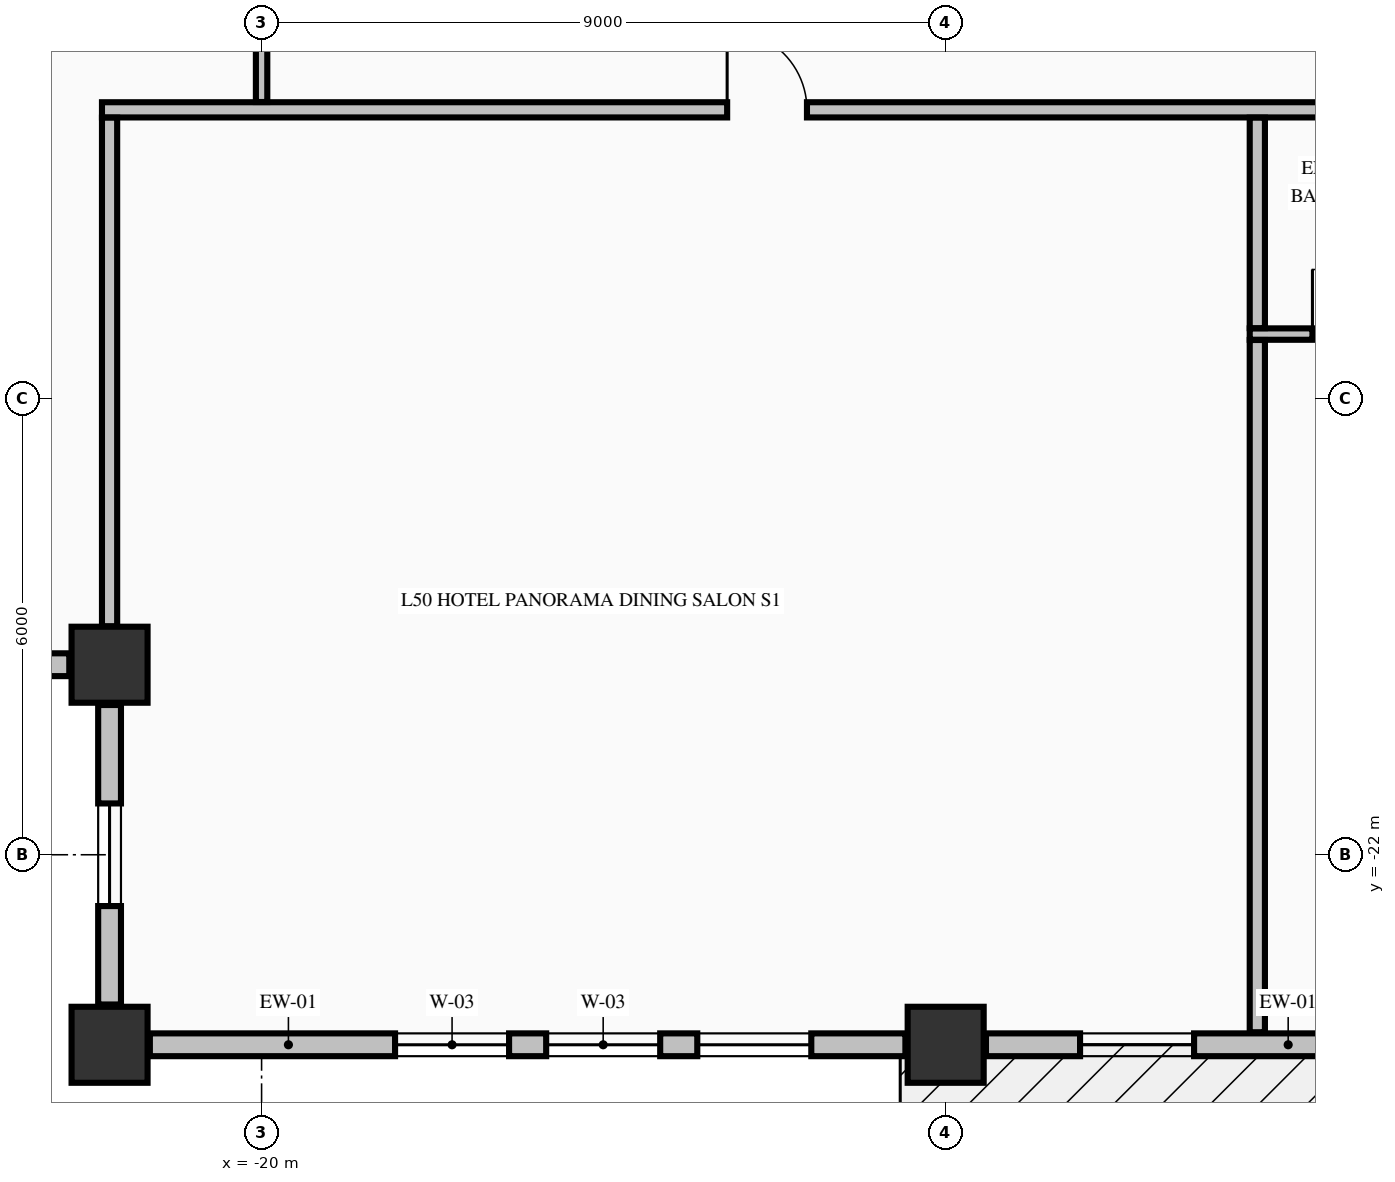
"""IFC4 building model, lengths in metres.
Left out: names, types, materials, properties, quantities, classifications, styles, units other than length and angle.
Written with IfcOpenShell. Run it as: python <this file> out.ifc"""

import sys

from ifc_helpers import new_model, si_unit, direction, frame, frame_2d, origin, origin_2d, place, context, subcontext, project, spatial, rectangle, extrude, element, fill, save


model = new_model("IFC4")
c1 = context("Model", 3, precision=1e-05, world=origin(), true_north=direction((0.0, 1.0)))
c2 = subcontext(c1, "Body", "Model", "MODEL_VIEW")
j1 = project(units=[si_unit("LENGTHUNIT", "METRE"), si_unit("PLANEANGLEUNIT", "RADIAN")], contexts=[c1])
p1 = place(None, origin())
s1 = spatial("IfcSite", under=j1, at=p1, CompositionType="ELEMENT")
p2 = place(p1, origin())
s2 = spatial("IfcBuilding", under=s1, at=p2, CompositionType="ELEMENT")
p3 = place(p2, frame((0.0, 0.0, 194.86)))
s3 = spatial("IfcBuildingStorey", under=s2, at=p3, CompositionType="ELEMENT", Elevation=194.86)
for number, where, z_axis, x_axis in (
    (1, (-22.0, -24.5, -0.275), (0.0, 0.0, 1.0), (1.0, 0.0, 0.0)),
    (2, (-11.0, -24.5, -0.275), (0.0, 0.0, 1.0), (1.0, 0.0, 0.0)),
    (3, (-22.0, -19.5, -0.275), (0.0, 0.0, 1.0), (1.0, 0.0, 0.0)),
):
    element("IfcColumn", number, at=place(p3, frame(where, z_axis=z_axis, x_axis=x_axis)), inside=s3, PredefinedType="COLUMN", context=c2, shape_type="SweptSolid", body=[
        extrude(rectangle(XDim=1.0, YDim=1.0, at=origin_2d()), origin(), (0.0, 0.0, 1.0), 3.425),
    ])
p4 = place(p3, frame((-26.47, -19.5, 0.0), z_axis=(0.0, 0.0, 1.0), x_axis=(1.0, 0.0, 0.0)))
e4 = element("IfcWall", 4, at=p4, inside=s3, PredefinedType="STANDARD", context=c2, shape_type="SweptSolid", body=[
    extrude(rectangle(XDim=3.94, YDim=0.3, at=frame_2d((1.97, 0.0))), origin(), (0.0, 0.0, 1.0), 2.542),
])
p5 = place(p4, frame((1.295, 0.0, 0.68)))
e5 = element("IfcOpeningElement", 5, at=p5, cuts=e4, PredefinedType="OPENING", context=c2, shape_type="SweptSolid", body=[
    extrude(rectangle(XDim=1.35, YDim=1.42, at=frame_2d((0.675, 0.71))), frame((0.0, 0.16, 0.0), z_axis=(0.0, -1.0, 0.0), x_axis=(1.0, 0.0, 0.0)), (0.0, 0.0, 1.0), 0.32),
])
p6 = place(p3, frame((-22.0, -20.03, 0.0), z_axis=(0.0, 0.0, 1.0), x_axis=(0.0, -1.0, 0.0)))
e6 = element("IfcWall", 6, at=p6, inside=s3, PredefinedType="STANDARD", context=c2, shape_type="SweptSolid", body=[
    extrude(rectangle(XDim=3.94, YDim=0.3, at=frame_2d((1.97, 0.0))), origin(), (0.0, 0.0, 1.0), 2.542),
])
p7 = place(p6, frame((1.295, 0.0, 0.68)))
e7 = element("IfcOpeningElement", 7, at=p7, cuts=e6, PredefinedType="OPENING", context=c2, shape_type="SweptSolid", body=[
    extrude(rectangle(XDim=1.35, YDim=1.42, at=frame_2d((0.675, 0.71))), frame((0.0, 0.16, 0.0), z_axis=(0.0, -1.0, 0.0), x_axis=(1.0, 0.0, 0.0)), (0.0, 0.0, 1.0), 0.32),
])
p8 = place(p3, frame((-21.47, -24.5, 0.0), z_axis=(0.0, 0.0, 1.0), x_axis=(1.0, 0.0, 0.0)))
e8 = element("IfcWall", 8, at=p8, inside=s3, PredefinedType="STANDARD", context=c2, shape_type="SweptSolid", body=[
    extrude(rectangle(XDim=9.94, YDim=0.3, at=frame_2d((4.97, 0.0))), origin(), (0.0, 0.0, 1.0), 2.542),
])
p9 = place(p8, frame((3.226, 0.0, 0.72)))
e9 = element("IfcOpeningElement", 9, at=p9, cuts=e8, PredefinedType="OPENING", context=c2, shape_type="SweptSolid", body=[
    extrude(rectangle(XDim=1.5, YDim=1.6, at=frame_2d((0.75, 0.8))), frame((0.0, 0.16, 0.0), z_axis=(0.0, -1.0, 0.0), x_axis=(1.0, 0.0, 0.0)), (0.0, 0.0, 1.0), 0.32),
])
p10 = place(p8, frame((5.214, 0.0, 0.72)))
e10 = element("IfcOpeningElement", 10, at=p10, cuts=e8, PredefinedType="OPENING", context=c2, shape_type="SweptSolid", body=[
    extrude(rectangle(XDim=1.5, YDim=1.6, at=frame_2d((0.75, 0.8))), frame((0.0, 0.16, 0.0), z_axis=(0.0, -1.0, 0.0), x_axis=(1.0, 0.0, 0.0)), (0.0, 0.0, 1.0), 0.32),
])
p11 = place(p8, frame((7.202, 0.0, 0.72)))
e11 = element("IfcOpeningElement", 11, at=p11, cuts=e8, PredefinedType="OPENING", context=c2, shape_type="SweptSolid", body=[
    extrude(rectangle(XDim=1.5, YDim=1.6, at=frame_2d((0.75, 0.8))), frame((0.0, 0.16, 0.0), z_axis=(0.0, -1.0, 0.0), x_axis=(1.0, 0.0, 0.0)), (0.0, 0.0, 1.0), 0.32),
])
p12 = place(p3, frame((-10.47, -24.5, 0.0), z_axis=(0.0, 0.0, 1.0), x_axis=(1.0, 0.0, 0.0)))
e12 = element("IfcWall", 12, at=p12, inside=s3, PredefinedType="STANDARD", context=c2, shape_type="SweptSolid", body=[
    extrude(rectangle(XDim=9.94, YDim=0.3, at=frame_2d((4.97, 0.0))), origin(), (0.0, 0.0, 1.0), 2.542),
])
p13 = place(p12, frame((8.64, 0.0, 0.0)))
e13 = element("IfcOpeningElement", 13, at=p13, cuts=e12, PredefinedType="OPENING", context=c2, shape_type="SweptSolid", body=[
    extrude(rectangle(XDim=1.1, YDim=2.15, at=frame_2d((0.55, 1.075))), frame((0.0, 0.16, 0.0), z_axis=(0.0, -1.0, 0.0), x_axis=(1.0, 0.0, 0.0)), (0.0, 0.0, 1.0), 0.32),
])
p14 = place(p12, frame((1.238, 0.0, 0.72)))
e14 = element("IfcOpeningElement", 14, at=p14, cuts=e12, PredefinedType="OPENING", context=c2, shape_type="SweptSolid", body=[
    extrude(rectangle(XDim=1.5, YDim=1.6, at=frame_2d((0.75, 0.8))), frame((0.0, 0.16, 0.0), z_axis=(0.0, -1.0, 0.0), x_axis=(1.0, 0.0, 0.0)), (0.0, 0.0, 1.0), 0.32),
])
p15 = place(p12, frame((5.214, 0.0, 0.72)))
e15 = element("IfcOpeningElement", 15, at=p15, cuts=e12, PredefinedType="OPENING", context=c2, shape_type="SweptSolid", body=[
    extrude(rectangle(XDim=1.5, YDim=1.6, at=frame_2d((0.75, 0.8))), frame((0.0, 0.16, 0.0), z_axis=(0.0, -1.0, 0.0), x_axis=(1.0, 0.0, 0.0)), (0.0, 0.0, 1.0), 0.32),
])
p16 = place(p3, frame((-7.0, -15.15, 0.0), z_axis=(0.0, 0.0, 1.0), x_axis=(1.0, 0.0, 0.0)))
e16 = element("IfcWall", 16, at=p16, inside=s3, PredefinedType="PARTITIONING", context=c2, shape_type="SweptSolid", body=[
    extrude(rectangle(XDim=2.475, YDim=0.15, at=frame_2d((1.238, 0.0))), origin(), (0.0, 0.0, 1.0), 3.15),
])
p17 = place(p16, frame((0.825, 0.0, 0.0)))
e17 = element("IfcOpeningElement", 17, at=p17, cuts=e16, PredefinedType="OPENING", context=c2, shape_type="SweptSolid", body=[
    extrude(rectangle(XDim=0.85, YDim=2.1, at=frame_2d((0.425, 1.05))), frame((0.0, 0.085, 0.0), z_axis=(0.0, -1.0, 0.0), x_axis=(1.0, 0.0, 0.0)), (0.0, 0.0, 1.0), 0.17),
])
p18 = place(p3, frame((-22.1, -12.2, 0.0), z_axis=(0.0, 0.0, 1.0), x_axis=(1.0, 0.0, 0.0)))
e18 = element("IfcWall", 18, at=p18, inside=s3, PredefinedType="PARTITIONING", context=c2, shape_type="SweptSolid", body=[
    extrude(rectangle(XDim=39.2, YDim=0.2, at=frame_2d((19.6, 0.0))), origin(), (0.0, 0.0, 1.0), 3.15),
])
p19 = place(p18, frame((8.225, 0.0, 0.0)))
e19 = element("IfcOpeningElement", 19, at=p19, cuts=e18, PredefinedType="OPENING", context=c2, shape_type="SweptSolid", body=[
    extrude(rectangle(XDim=1.05, YDim=2.15, at=frame_2d((0.525, 1.075))), frame((0.0, 0.11, 0.0), z_axis=(0.0, -1.0, 0.0), x_axis=(1.0, 0.0, 0.0)), (0.0, 0.0, 1.0), 0.22),
])
p20 = place(p18, frame((18.675, 0.0, 0.0)))
e20 = element("IfcOpeningElement", 20, at=p20, cuts=e18, PredefinedType="OPENING", context=c2, shape_type="SweptSolid", body=[
    extrude(rectangle(XDim=0.95, YDim=2.15, at=frame_2d((0.475, 1.075))), frame((0.0, 0.11, 0.0), z_axis=(0.0, -1.0, 0.0), x_axis=(1.0, 0.0, 0.0)), (0.0, 0.0, 1.0), 0.22),
])
p21 = place(p18, frame((34.325, 0.0, 0.0)))
e21 = element("IfcOpeningElement", 21, at=p21, cuts=e18, PredefinedType="OPENING", context=c2, shape_type="SweptSolid", body=[
    extrude(rectangle(XDim=0.95, YDim=2.15, at=frame_2d((0.475, 1.075))), frame((0.0, 0.11, 0.0), z_axis=(0.0, -1.0, 0.0), x_axis=(1.0, 0.0, 0.0)), (0.0, 0.0, 1.0), 0.22),
])
p22 = place(p3, frame((-22.0, -18.994, 0.0), z_axis=(0.0, 0.0, 1.0), x_axis=(0.0, 1.0, 0.0)))
e22 = element("IfcWall", 22, at=p22, inside=s3, PredefinedType="PARTITIONING", context=c2, shape_type="SweptSolid", body=[
    extrude(rectangle(XDim=6.691, YDim=0.2, at=frame_2d((3.345, 0.0))), origin(), (0.0, 0.0, 1.0), 3.15),
])
p23 = place(p3, frame((-20.0, -12.097, 0.0), z_axis=(0.0, 0.0, 1.0), x_axis=(0.0, 1.0, 0.0)))
e23 = element("IfcWall", 23, at=p23, inside=s3, PredefinedType="PARTITIONING", context=c2, shape_type="SweptSolid", body=[
    extrude(rectangle(XDim=1.716, YDim=0.15, at=frame_2d((0.858, 0.0))), origin(), (0.0, 0.0, 1.0), 2.342),
])
p24 = place(p3, frame((-6.9, -24.335, 0.0), z_axis=(0.0, 0.0, 1.0), x_axis=(0.0, 1.0, 0.0)))
e24 = element("IfcWall", 24, at=p24, inside=s3, PredefinedType="PARTITIONING", context=c2, shape_type="SweptSolid", body=[
    extrude(rectangle(XDim=9.107, YDim=0.2, at=frame_2d((4.553, 0.0))), origin(), (0.0, 0.0, 1.0), 3.15),
])
p25 = place(p3, frame((-6.9, -15.072, 0.0), z_axis=(0.0, 0.0, 1.0), x_axis=(0.0, 1.0, 0.0)))
e25 = element("IfcWall", 25, at=p25, inside=s3, PredefinedType="PARTITIONING", context=c2, shape_type="SweptSolid", body=[
    extrude(rectangle(XDim=2.769, YDim=0.2, at=frame_2d((1.385, 0.0))), origin(), (0.0, 0.0, 1.0), 3.15),
])
p26 = place(p7, origin())
e26 = element("IfcWindow", 26, at=p26, inside=s3, PartitioningType="SINGLE_PANEL", PredefinedType="WINDOW", context=c2, shape_type="SweptSolid", body=[
    extrude(rectangle(XDim=1.35, YDim=1.42, at=frame_2d((0.675, 0.71))), frame((0.0, 0.03, 0.0), z_axis=(0.0, -1.0, 0.0), x_axis=(1.0, 0.0, 0.0)), (0.0, 0.0, 1.0), 0.06),
])
fill(e7, e26)
p27 = place(p9, origin())
e27 = element("IfcWindow", 27, at=p27, inside=s3, PartitioningType="SINGLE_PANEL", PredefinedType="WINDOW", context=c2, shape_type="SweptSolid", body=[
    extrude(rectangle(XDim=1.5, YDim=1.6, at=frame_2d((0.75, 0.8))), frame((0.0, 0.03, 0.0), z_axis=(0.0, -1.0, 0.0), x_axis=(1.0, 0.0, 0.0)), (0.0, 0.0, 1.0), 0.06),
])
fill(e9, e27)
p28 = place(p10, origin())
e28 = element("IfcWindow", 28, at=p28, inside=s3, PartitioningType="SINGLE_PANEL", PredefinedType="WINDOW", context=c2, shape_type="SweptSolid", body=[
    extrude(rectangle(XDim=1.5, YDim=1.6, at=frame_2d((0.75, 0.8))), frame((0.0, 0.03, 0.0), z_axis=(0.0, -1.0, 0.0), x_axis=(1.0, 0.0, 0.0)), (0.0, 0.0, 1.0), 0.06),
])
fill(e10, e28)
p29 = place(p11, origin())
e29 = element("IfcWindow", 29, at=p29, inside=s3, PartitioningType="SINGLE_PANEL", PredefinedType="WINDOW", context=c2, shape_type="SweptSolid", body=[
    extrude(rectangle(XDim=1.5, YDim=1.6, at=frame_2d((0.75, 0.8))), frame((0.0, 0.03, 0.0), z_axis=(0.0, -1.0, 0.0), x_axis=(1.0, 0.0, 0.0)), (0.0, 0.0, 1.0), 0.06),
])
fill(e11, e29)
p30 = place(p14, origin())
e30 = element("IfcWindow", 30, at=p30, inside=s3, PartitioningType="SINGLE_PANEL", PredefinedType="WINDOW", context=c2, shape_type="SweptSolid", body=[
    extrude(rectangle(XDim=1.5, YDim=1.6, at=frame_2d((0.75, 0.8))), frame((0.0, 0.03, 0.0), z_axis=(0.0, -1.0, 0.0), x_axis=(1.0, 0.0, 0.0)), (0.0, 0.0, 1.0), 0.06),
])
fill(e14, e30)
p31 = place(p19, origin())
e31 = element("IfcDoor", 31, at=p31, inside=s3, OperationType="SINGLE_SWING_LEFT", PredefinedType="DOOR", context=c2, shape_type="SweptSolid", body=[
    extrude(rectangle(XDim=1.05, YDim=2.15, at=frame_2d((0.525, 1.075))), frame((0.0, 0.025, 0.0), z_axis=(0.0, -1.0, 0.0), x_axis=(1.0, 0.0, 0.0)), (0.0, 0.0, 1.0), 0.05),
])
fill(e19, e31)
p32 = place(p17, origin())
e32 = element("IfcDoor", 32, at=p32, inside=s3, OperationType="SINGLE_SWING_LEFT", PredefinedType="DOOR", context=c2, shape_type="SweptSolid", body=[
    extrude(rectangle(XDim=0.85, YDim=2.1, at=frame_2d((0.425, 1.05))), frame((0.0, 0.025, 0.0), z_axis=(0.0, -1.0, 0.0), x_axis=(1.0, 0.0, 0.0)), (0.0, 0.0, 1.0), 0.05),
])
fill(e17, e32)
save(model, sys.argv[1])
